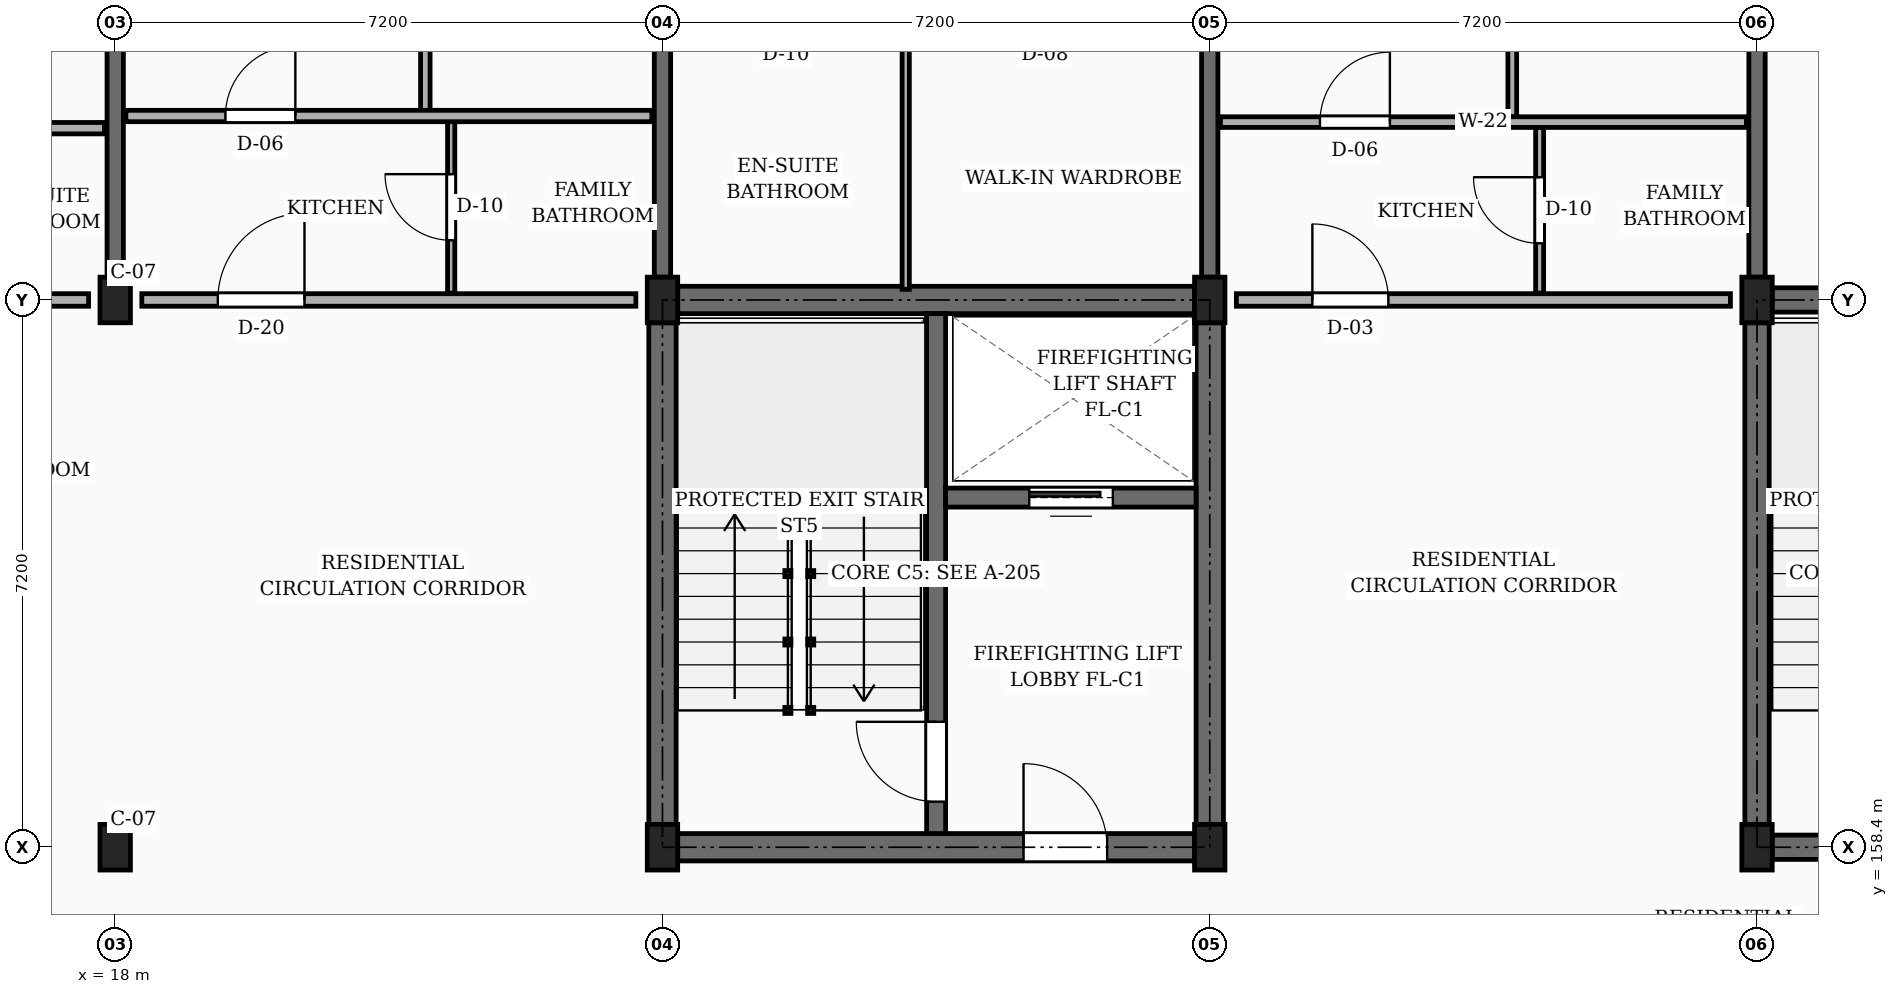
"""IFC4 building model, lengths in metres.
Left out: names, types, materials, properties, quantities, classifications, styles, units other than length and angle.
Written with IfcOpenShell. Run it as: python <this file> out.ifc"""

import sys

from ifc_helpers import new_model, si_unit, direction, frame, frame_2d, origin, origin_2d, place, context, subcontext, project, spatial, rectangle, extrude, element, fill, save


model = new_model("IFC4")
c1 = context("Model", 3, precision=1e-05, world=origin(), true_north=direction((0.0, 1.0)))
c2 = subcontext(c1, "Body", "Model", "MODEL_VIEW")
j1 = project(units=[si_unit("LENGTHUNIT", "METRE"), si_unit("PLANEANGLEUNIT", "RADIAN")], contexts=[c1])
p1 = place(None, origin())
s1 = spatial("IfcSite", under=j1, at=p1, CompositionType="ELEMENT")
p2 = place(p1, origin())
s2 = spatial("IfcBuilding", under=s1, at=p2, CompositionType="ELEMENT")
p3 = place(p2, frame((0.0, 0.0, 29.7)))
s3 = spatial("IfcBuildingStorey", under=s2, at=p3, CompositionType="ELEMENT", Elevation=29.7)
for number, where, z_axis, x_axis in (
    (1, (18.0, 158.4, 0.0), (0.0, 0.0, 1.0), (1.0, 0.0, 0.0)),
    (2, (18.0, 165.6, 0.0), (0.0, 0.0, 1.0), (1.0, 0.0, 0.0)),
    (3, (25.2, 158.4, 0.0), (0.0, 0.0, 1.0), (1.0, 0.0, 0.0)),
    (4, (25.2, 165.6, 0.0), (0.0, 0.0, 1.0), (1.0, 0.0, 0.0)),
    (5, (32.4, 158.4, 0.0), (0.0, 0.0, 1.0), (1.0, 0.0, 0.0)),
    (6, (32.4, 165.6, 0.0), (0.0, 0.0, 1.0), (1.0, 0.0, 0.0)),
    (7, (39.6, 158.4, 0.0), (0.0, 0.0, 1.0), (1.0, 0.0, 0.0)),
    (8, (39.6, 165.6, 0.0), (0.0, 0.0, 1.0), (1.0, 0.0, 0.0)),
):
    element("IfcColumn", number, at=place(p3, frame(where, z_axis=z_axis, x_axis=x_axis)), inside=s3, PredefinedType="COLUMN", context=c2, shape_type="SweptSolid", body=[
        extrude(rectangle(XDim=0.4, YDim=0.6, at=origin_2d()), origin(), (0.0, 0.0, 1.0), 3.15),
    ])
p4 = place(p3, frame((18.0, 165.9, 0.0), z_axis=(0.0, 0.0, 1.0), x_axis=(0.0, 1.0, 0.0)))
e9 = element("IfcWall", 9, at=p4, inside=s3, PredefinedType="SOLIDWALL", context=c2, shape_type="SweptSolid", body=[
    extrude(rectangle(XDim=6.65, YDim=0.215, at=frame_2d((3.325, 0.0))), origin(), (0.0, 0.0, 1.0), 2.185),
])
p5 = place(p3, frame((25.2, 165.9, 0.0), z_axis=(0.0, 0.0, 1.0), x_axis=(0.0, 1.0, 0.0)))
e10 = element("IfcWall", 10, at=p5, inside=s3, PredefinedType="SOLIDWALL", context=c2, shape_type="SweptSolid", body=[
    extrude(rectangle(XDim=6.65, YDim=0.215, at=frame_2d((3.325, 0.0))), origin(), (0.0, 0.0, 1.0), 2.185),
])
p6 = place(p5, frame((4.15, 0.0, 0.0)))
e11 = element("IfcOpeningElement", 11, at=p6, cuts=e10, PredefinedType="OPENING", context=c2, shape_type="SweptSolid", body=[
    extrude(rectangle(XDim=0.98, YDim=2.12, at=frame_2d((0.49, 1.06))), frame((0.0, 0.118, 0.0), z_axis=(0.0, -1.0, 0.0), x_axis=(1.0, 0.0, 0.0)), (0.0, 0.0, 1.0), 0.235),
])
p7 = place(p3, frame((32.4, 165.9, 0.0), z_axis=(0.0, 0.0, 1.0), x_axis=(0.0, 1.0, 0.0)))
e12 = element("IfcWall", 12, at=p7, inside=s3, PredefinedType="SOLIDWALL", context=c2, shape_type="SweptSolid", body=[
    extrude(rectangle(XDim=6.65, YDim=0.215, at=frame_2d((3.325, 0.0))), origin(), (0.0, 0.0, 1.0), 2.185),
])
p8 = place(p3, frame((39.6, 165.9, 0.0), z_axis=(0.0, 0.0, 1.0), x_axis=(0.0, 1.0, 0.0)))
e13 = element("IfcWall", 13, at=p8, inside=s3, PredefinedType="SOLIDWALL", context=c2, shape_type="SweptSolid", body=[
    extrude(rectangle(XDim=6.65, YDim=0.215, at=frame_2d((3.325, 0.0))), origin(), (0.0, 0.0, 1.0), 2.185),
])
p9 = place(p8, frame((4.15, 0.0, 0.0)))
e14 = element("IfcOpeningElement", 14, at=p9, cuts=e13, PredefinedType="OPENING", context=c2, shape_type="SweptSolid", body=[
    extrude(rectangle(XDim=0.98, YDim=2.12, at=frame_2d((0.49, 1.06))), frame((0.0, 0.118, 0.0), z_axis=(0.0, -1.0, 0.0), x_axis=(1.0, 0.0, 0.0)), (0.0, 0.0, 1.0), 0.235),
])
p10 = place(p3, frame((25.2, 158.7, 0.0), z_axis=(0.0, 0.0, 1.0), x_axis=(0.0, 1.0, 0.0)))
e15 = element("IfcWall", 15, at=p10, inside=s3, PredefinedType="SHEAR", context=c2, shape_type="SweptSolid", body=[
    extrude(rectangle(XDim=6.6, YDim=0.36, at=frame_2d((3.3, 0.0))), origin(), (0.0, 0.0, 1.0), 2.885),
])
p11 = place(p3, frame((25.4, 165.6, 0.0), z_axis=(0.0, 0.0, 1.0), x_axis=(1.0, 0.0, 0.0)))
e16 = element("IfcWall", 16, at=p11, inside=s3, PredefinedType="SHEAR", context=c2, shape_type="SweptSolid", body=[
    extrude(rectangle(XDim=6.8, YDim=0.36, at=frame_2d((3.4, 0.0))), origin(), (0.0, 0.0, 1.0), 2.885),
])
p12 = place(p3, frame((32.4, 158.7, 0.0), z_axis=(0.0, 0.0, 1.0), x_axis=(0.0, 1.0, 0.0)))
e17 = element("IfcWall", 17, at=p12, inside=s3, PredefinedType="SHEAR", context=c2, shape_type="SweptSolid", body=[
    extrude(rectangle(XDim=6.6, YDim=0.36, at=frame_2d((3.3, 0.0))), origin(), (0.0, 0.0, 1.0), 2.885),
])
p13 = place(p3, frame((25.4, 158.4, 0.0), z_axis=(0.0, 0.0, 1.0), x_axis=(1.0, 0.0, 0.0)))
e18 = element("IfcWall", 18, at=p13, inside=s3, PredefinedType="SHEAR", context=c2, shape_type="SweptSolid", body=[
    extrude(rectangle(XDim=6.8, YDim=0.36, at=frame_2d((3.4, 0.0))), origin(), (0.0, 0.0, 1.0), 2.885),
])
p14 = place(p13, frame((4.55, 0.0, 0.0)))
e19 = element("IfcOpeningElement", 19, at=p14, cuts=e18, PredefinedType="OPENING", context=c2, shape_type="SweptSolid", body=[
    extrude(rectangle(XDim=1.1, YDim=2.15, at=frame_2d((0.55, 1.075))), frame((0.0, 0.19, 0.0), z_axis=(0.0, -1.0, 0.0), x_axis=(1.0, 0.0, 0.0)), (0.0, 0.0, 1.0), 0.38),
])
p15 = place(p3, frame((28.8, 158.58, 0.0), z_axis=(0.0, 0.0, 1.0), x_axis=(0.0, 1.0, 0.0)))
e20 = element("IfcWall", 20, at=p15, inside=s3, PredefinedType="SHEAR", context=c2, shape_type="SweptSolid", body=[
    extrude(rectangle(XDim=6.84, YDim=0.25, at=frame_2d((3.42, 0.0))), origin(), (0.0, 0.0, 1.0), 2.885),
])
p16 = place(p15, frame((0.42, 0.0, 0.0)))
e21 = element("IfcOpeningElement", 21, at=p16, cuts=e20, PredefinedType="OPENING", context=c2, shape_type="SweptSolid", body=[
    extrude(rectangle(XDim=1.05, YDim=2.15, at=frame_2d((0.525, 1.075))), frame((0.0, 0.135, 0.0), z_axis=(0.0, -1.0, 0.0), x_axis=(1.0, 0.0, 0.0)), (0.0, 0.0, 1.0), 0.27),
])
p17 = place(p3, frame((28.925, 163.0, 0.0), z_axis=(0.0, 0.0, 1.0), x_axis=(1.0, 0.0, 0.0)))
e22 = element("IfcWall", 22, at=p17, inside=s3, PredefinedType="SHEAR", context=c2, shape_type="SweptSolid", body=[
    extrude(rectangle(XDim=3.295, YDim=0.25, at=frame_2d((1.647, 0.0))), origin(), (0.0, 0.0, 1.0), 2.885),
])
p18 = place(p17, frame((1.1, 0.0, 0.0)))
e23 = element("IfcOpeningElement", 23, at=p18, cuts=e22, PredefinedType="OPENING", context=c2, shape_type="SweptSolid", body=[
    extrude(rectangle(XDim=1.1, YDim=2.2, at=frame_2d((0.55, 1.1))), frame((0.0, 0.135, 0.0), z_axis=(0.0, -1.0, 0.0), x_axis=(1.0, 0.0, 0.0)), (0.0, 0.0, 1.0), 0.27),
])
p19 = place(p3, frame((39.6, 158.7, 0.0), z_axis=(0.0, 0.0, 1.0), x_axis=(0.0, 1.0, 0.0)))
e24 = element("IfcWall", 24, at=p19, inside=s3, PredefinedType="SHEAR", context=c2, shape_type="SweptSolid", body=[
    extrude(rectangle(XDim=6.6, YDim=0.32, at=frame_2d((3.3, 0.0))), origin(), (0.0, 0.0, 1.0), 2.885),
])
p20 = place(p3, frame((39.8, 165.6, 0.0), z_axis=(0.0, 0.0, 1.0), x_axis=(1.0, 0.0, 0.0)))
e25 = element("IfcWall", 25, at=p20, inside=s3, PredefinedType="SHEAR", context=c2, shape_type="SweptSolid", body=[
    extrude(rectangle(XDim=6.8, YDim=0.32, at=frame_2d((3.4, 0.0))), origin(), (0.0, 0.0, 1.0), 2.885),
])
p21 = place(p3, frame((39.8, 158.4, 0.0), z_axis=(0.0, 0.0, 1.0), x_axis=(1.0, 0.0, 0.0)))
e26 = element("IfcWall", 26, at=p21, inside=s3, PredefinedType="SHEAR", context=c2, shape_type="SweptSolid", body=[
    extrude(rectangle(XDim=6.8, YDim=0.32, at=frame_2d((3.4, 0.0))), origin(), (0.0, 0.0, 1.0), 2.885),
])
p22 = place(p21, frame((4.55, 0.0, 0.0)))
e27 = element("IfcOpeningElement", 27, at=p22, cuts=e26, PredefinedType="OPENING", context=c2, shape_type="SweptSolid", body=[
    extrude(rectangle(XDim=1.1, YDim=2.15, at=frame_2d((0.55, 1.075))), frame((0.0, 0.17, 0.0), z_axis=(0.0, -1.0, 0.0), x_axis=(1.0, 0.0, 0.0)), (0.0, 0.0, 1.0), 0.34),
])
p23 = place(p3, frame((11.15, 165.6, 0.0), z_axis=(0.0, 0.0, 1.0), x_axis=(1.0, 0.0, 0.0)))
e28 = element("IfcWall", 28, at=p23, inside=s3, PredefinedType="PARTITIONING", context=c2, shape_type="SweptSolid", body=[
    extrude(rectangle(XDim=6.5, YDim=0.165, at=frame_2d((3.25, 0.0))), origin(), (0.0, 0.0, 1.0), 2.32),
])
p24 = place(p23, frame((1.0, 0.0, 0.0)))
e29 = element("IfcOpeningElement", 29, at=p24, cuts=e28, PredefinedType="OPENING", context=c2, shape_type="SweptSolid", body=[
    extrude(rectangle(XDim=0.94, YDim=2.12, at=frame_2d((0.47, 1.06))), frame((0.0, 0.093, 0.0), z_axis=(0.0, -1.0, 0.0), x_axis=(1.0, 0.0, 0.0)), (0.0, 0.0, 1.0), 0.185),
])
p25 = place(p3, frame((18.35, 165.6, 0.0), z_axis=(0.0, 0.0, 1.0), x_axis=(1.0, 0.0, 0.0)))
e30 = element("IfcWall", 30, at=p25, inside=s3, PredefinedType="PARTITIONING", context=c2, shape_type="SweptSolid", body=[
    extrude(rectangle(XDim=6.5, YDim=0.165, at=frame_2d((3.25, 0.0))), origin(), (0.0, 0.0, 1.0), 2.32),
])
p26 = place(p25, frame((1.0, 0.0, 0.0)))
e31 = element("IfcOpeningElement", 31, at=p26, cuts=e30, PredefinedType="OPENING", context=c2, shape_type="SweptSolid", body=[
    extrude(rectangle(XDim=1.14, YDim=2.18, at=frame_2d((0.57, 1.09))), frame((0.0, 0.093, 0.0), z_axis=(0.0, -1.0, 0.0), x_axis=(1.0, 0.0, 0.0)), (0.0, 0.0, 1.0), 0.185),
])
p27 = place(p3, frame((32.75, 165.6, 0.0), z_axis=(0.0, 0.0, 1.0), x_axis=(1.0, 0.0, 0.0)))
e32 = element("IfcWall", 32, at=p27, inside=s3, PredefinedType="PARTITIONING", context=c2, shape_type="SweptSolid", body=[
    extrude(rectangle(XDim=6.5, YDim=0.165, at=frame_2d((3.25, 0.0))), origin(), (0.0, 0.0, 1.0), 2.32),
])
p28 = place(p27, frame((1.0, 0.0, 0.0)))
e33 = element("IfcOpeningElement", 33, at=p28, cuts=e32, PredefinedType="OPENING", context=c2, shape_type="SweptSolid", body=[
    extrude(rectangle(XDim=1.0, YDim=2.15, at=frame_2d((0.5, 1.075))), frame((0.0, 0.093, 0.0), z_axis=(0.0, -1.0, 0.0), x_axis=(1.0, 0.0, 0.0)), (0.0, 0.0, 1.0), 0.185),
])
p29 = place(p3, frame((10.975, 167.86, 0.0), z_axis=(0.0, 0.0, 1.0), x_axis=(1.0, 0.0, 0.0)))
e34 = element("IfcWall", 34, at=p29, inside=s3, PredefinedType="PARTITIONING", context=c2, shape_type="SweptSolid", body=[
    extrude(rectangle(XDim=6.885, YDim=0.15, at=frame_2d((3.442, 0.0))), origin(), (0.0, 0.0, 1.0), 2.32),
])
p30 = place(p29, frame((1.275, 0.0, 0.0)))
e35 = element("IfcOpeningElement", 35, at=p30, cuts=e34, PredefinedType="OPENING", context=c2, shape_type="SweptSolid", body=[
    extrude(rectangle(XDim=0.95, YDim=2.1, at=frame_2d((0.475, 1.05))), frame((0.0, 0.085, 0.0), z_axis=(0.0, -1.0, 0.0), x_axis=(1.0, 0.0, 0.0)), (0.0, 0.0, 1.0), 0.17),
])
p31 = place(p3, frame((22.08, 168.09, 0.0), z_axis=(0.0, 0.0, 1.0), x_axis=(0.0, 1.0, 0.0)))
e36 = element("IfcWall", 36, at=p31, inside=s3, PredefinedType="PARTITIONING", context=c2, shape_type="SweptSolid", body=[
    extrude(rectangle(XDim=4.535, YDim=0.125, at=frame_2d((2.268, 0.0))), origin(), (0.0, 0.0, 1.0), 2.32),
])
p32 = place(p31, frame((1.827, 0.0, 0.0)))
e37 = element("IfcOpeningElement", 37, at=p32, cuts=e36, PredefinedType="OPENING", context=c2, shape_type="SweptSolid", body=[
    extrude(rectangle(XDim=0.88, YDim=2.08, at=frame_2d((0.44, 1.04))), frame((0.0, 0.073, 0.0), z_axis=(0.0, -1.0, 0.0), x_axis=(1.0, 0.0, 0.0)), (0.0, 0.0, 1.0), 0.145),
])
p33 = place(p3, frame((22.42, 165.69, 0.0), z_axis=(0.0, 0.0, 1.0), x_axis=(0.0, 1.0, 0.0)))
e38 = element("IfcWall", 38, at=p33, inside=s3, PredefinedType="PARTITIONING", context=c2, shape_type="SweptSolid", body=[
    extrude(rectangle(XDim=2.26, YDim=0.095, at=frame_2d((1.13, 0.0))), origin(), (0.0, 0.0, 1.0), 2.32),
])
p34 = place(p33, frame((0.695, 0.0, 0.0)))
e39 = element("IfcOpeningElement", 39, at=p34, cuts=e38, PredefinedType="OPENING", context=c2, shape_type="SweptSolid", body=[
    extrude(rectangle(XDim=0.87, YDim=2.05, at=frame_2d((0.435, 1.025))), frame((0.0, 0.058, 0.0), z_axis=(0.0, -1.0, 0.0), x_axis=(1.0, 0.0, 0.0)), (0.0, 0.0, 1.0), 0.115),
])
p35 = place(p3, frame((18.14, 168.02, 0.0), z_axis=(0.0, 0.0, 1.0), x_axis=(1.0, 0.0, 0.0)))
e40 = element("IfcWall", 40, at=p35, inside=s3, PredefinedType="PARTITIONING", context=c2, shape_type="SweptSolid", body=[
    extrude(rectangle(XDim=6.92, YDim=0.15, at=frame_2d((3.46, 0.0))), origin(), (0.0, 0.0, 1.0), 2.32),
])
p36 = place(p35, frame((1.31, 0.0, 0.0)))
e41 = element("IfcOpeningElement", 41, at=p36, cuts=e40, PredefinedType="OPENING", context=c2, shape_type="SweptSolid", body=[
    extrude(rectangle(XDim=0.92, YDim=2.1, at=frame_2d((0.46, 1.05))), frame((0.0, 0.085, 0.0), z_axis=(0.0, -1.0, 0.0), x_axis=(1.0, 0.0, 0.0)), (0.0, 0.0, 1.0), 0.17),
])
p37 = place(p3, frame((28.4, 165.74, 0.0), z_axis=(0.0, 0.0, 1.0), x_axis=(0.0, 1.0, 0.0)))
e42 = element("IfcWall", 42, at=p37, inside=s3, PredefinedType="PARTITIONING", context=c2, shape_type="SweptSolid", body=[
    extrude(rectangle(XDim=3.39, YDim=0.095, at=frame_2d((1.695, 0.0))), origin(), (0.0, 0.0, 1.0), 2.32),
])
p38 = place(p3, frame((36.38, 168.01, 0.0), z_axis=(0.0, 0.0, 1.0), x_axis=(0.0, 1.0, 0.0)))
e43 = element("IfcWall", 43, at=p38, inside=s3, PredefinedType="PARTITIONING", context=c2, shape_type="SweptSolid", body=[
    extrude(rectangle(XDim=4.615, YDim=0.115, at=frame_2d((2.308, 0.0))), origin(), (0.0, 0.0, 1.0), 2.32),
])
p39 = place(p38, frame((1.867, 0.0, 0.0)))
e44 = element("IfcOpeningElement", 44, at=p39, cuts=e43, PredefinedType="OPENING", context=c2, shape_type="SweptSolid", body=[
    extrude(rectangle(XDim=0.88, YDim=2.08, at=frame_2d((0.44, 1.04))), frame((0.0, 0.067, 0.0), z_axis=(0.0, -1.0, 0.0), x_axis=(1.0, 0.0, 0.0)), (0.0, 0.0, 1.0), 0.135),
])
p40 = place(p3, frame((36.74, 165.69, 0.0), z_axis=(0.0, 0.0, 1.0), x_axis=(0.0, 1.0, 0.0)))
e45 = element("IfcWall", 45, at=p40, inside=s3, PredefinedType="PARTITIONING", context=c2, shape_type="SweptSolid", body=[
    extrude(rectangle(XDim=2.18, YDim=0.105, at=frame_2d((1.09, 0.0))), origin(), (0.0, 0.0, 1.0), 2.32),
])
p41 = place(p40, frame((0.655, 0.0, 0.0)))
e46 = element("IfcOpeningElement", 46, at=p41, cuts=e45, PredefinedType="OPENING", context=c2, shape_type="SweptSolid", body=[
    extrude(rectangle(XDim=0.87, YDim=2.05, at=frame_2d((0.435, 1.025))), frame((0.0, 0.062, 0.0), z_axis=(0.0, -1.0, 0.0), x_axis=(1.0, 0.0, 0.0)), (0.0, 0.0, 1.0), 0.125),
])
p42 = place(p3, frame((32.54, 167.94, 0.0), z_axis=(0.0, 0.0, 1.0), x_axis=(1.0, 0.0, 0.0)))
e47 = element("IfcWall", 47, at=p42, inside=s3, PredefinedType="PARTITIONING", context=c2, shape_type="SweptSolid", body=[
    extrude(rectangle(XDim=6.92, YDim=0.14, at=frame_2d((3.46, 0.0))), origin(), (0.0, 0.0, 1.0), 2.32),
])
p43 = place(p42, frame((1.31, 0.0, 0.0)))
e48 = element("IfcOpeningElement", 48, at=p43, cuts=e47, PredefinedType="OPENING", context=c2, shape_type="SweptSolid", body=[
    extrude(rectangle(XDim=0.92, YDim=2.1, at=frame_2d((0.46, 1.05))), frame((0.0, 0.08, 0.0), z_axis=(0.0, -1.0, 0.0), x_axis=(1.0, 0.0, 0.0)), (0.0, 0.0, 1.0), 0.16),
])
p44 = place(p14, frame((1.1, 0.0, 0.0), z_axis=(0.0, 0.0, 1.0), x_axis=(-1.0, 0.0, 0.0)))
e49 = element("IfcDoor", 49, at=p44, inside=s3, OperationType="SINGLE_SWING_LEFT", PredefinedType="DOOR", context=c2, shape_type="SweptSolid", body=[
    extrude(rectangle(XDim=1.1, YDim=2.15, at=frame_2d((0.55, 1.075))), frame((0.0, 0.025, 0.0), z_axis=(0.0, -1.0, 0.0), x_axis=(1.0, 0.0, 0.0)), (0.0, 0.0, 1.0), 0.05),
])
fill(e19, e49)
p45 = place(p16, origin())
e50 = element("IfcDoor", 50, at=p45, inside=s3, OperationType="SINGLE_SWING_RIGHT", PredefinedType="DOOR", context=c2, shape_type="SweptSolid", body=[
    extrude(rectangle(XDim=1.05, YDim=2.15, at=frame_2d((0.525, 1.075))), frame((0.0, 0.025, 0.0), z_axis=(0.0, -1.0, 0.0), x_axis=(1.0, 0.0, 0.0)), (0.0, 0.0, 1.0), 0.05),
])
fill(e21, e50)
p46 = place(p18, origin())
e51 = element("IfcDoor", 51, at=p46, inside=s3, OperationType="SLIDING_TO_LEFT", PredefinedType="DOOR", context=c2, shape_type="SweptSolid", body=[
    extrude(rectangle(XDim=1.1, YDim=2.2, at=frame_2d((0.55, 1.1))), frame((0.0, 0.025, 0.0), z_axis=(0.0, -1.0, 0.0), x_axis=(1.0, 0.0, 0.0)), (0.0, 0.0, 1.0), 0.05),
])
fill(e23, e51)
p47 = place(p26, origin())
e52 = element("IfcDoor", 52, at=p47, inside=s3, OperationType="SINGLE_SWING_RIGHT", PredefinedType="DOOR", context=c2, shape_type="SweptSolid", body=[
    extrude(rectangle(XDim=1.14, YDim=2.18, at=frame_2d((0.57, 1.09))), frame((0.0, 0.025, 0.0), z_axis=(0.0, -1.0, 0.0), x_axis=(1.0, 0.0, 0.0)), (0.0, 0.0, 1.0), 0.05),
])
fill(e31, e52)
p48 = place(p28, origin())
e53 = element("IfcDoor", 53, at=p48, inside=s3, OperationType="SINGLE_SWING_LEFT", PredefinedType="DOOR", context=c2, shape_type="SweptSolid", body=[
    extrude(rectangle(XDim=1.0, YDim=2.15, at=frame_2d((0.5, 1.075))), frame((0.0, 0.025, 0.0), z_axis=(0.0, -1.0, 0.0), x_axis=(1.0, 0.0, 0.0)), (0.0, 0.0, 1.0), 0.05),
])
fill(e33, e53)
p49 = place(p34, origin())
e54 = element("IfcDoor", 54, at=p49, inside=s3, OperationType="SINGLE_SWING_RIGHT", PredefinedType="DOOR", context=c2, shape_type="SweptSolid", body=[
    extrude(rectangle(XDim=0.87, YDim=2.05, at=frame_2d((0.435, 1.025))), frame((0.0, 0.025, 0.0), z_axis=(0.0, -1.0, 0.0), x_axis=(1.0, 0.0, 0.0)), (0.0, 0.0, 1.0), 0.05),
])
fill(e39, e54)
p50 = place(p36, origin())
e55 = element("IfcDoor", 55, at=p50, inside=s3, OperationType="SINGLE_SWING_RIGHT", PredefinedType="DOOR", context=c2, shape_type="SweptSolid", body=[
    extrude(rectangle(XDim=0.92, YDim=2.1, at=frame_2d((0.46, 1.05))), frame((0.0, 0.025, 0.0), z_axis=(0.0, -1.0, 0.0), x_axis=(1.0, 0.0, 0.0)), (0.0, 0.0, 1.0), 0.05),
])
fill(e41, e55)
p51 = place(p41, origin())
e56 = element("IfcDoor", 56, at=p51, inside=s3, OperationType="SINGLE_SWING_RIGHT", PredefinedType="DOOR", context=c2, shape_type="SweptSolid", body=[
    extrude(rectangle(XDim=0.87, YDim=2.05, at=frame_2d((0.435, 1.025))), frame((0.0, 0.025, 0.0), z_axis=(0.0, -1.0, 0.0), x_axis=(1.0, 0.0, 0.0)), (0.0, 0.0, 1.0), 0.05),
])
fill(e46, e56)
p52 = place(p43, origin())
e57 = element("IfcDoor", 57, at=p52, inside=s3, OperationType="SINGLE_SWING_RIGHT", PredefinedType="DOOR", context=c2, shape_type="SweptSolid", body=[
    extrude(rectangle(XDim=0.92, YDim=2.1, at=frame_2d((0.46, 1.05))), frame((0.0, 0.025, 0.0), z_axis=(0.0, -1.0, 0.0), x_axis=(1.0, 0.0, 0.0)), (0.0, 0.0, 1.0), 0.05),
])
fill(e48, e57)
save(model, sys.argv[1])
